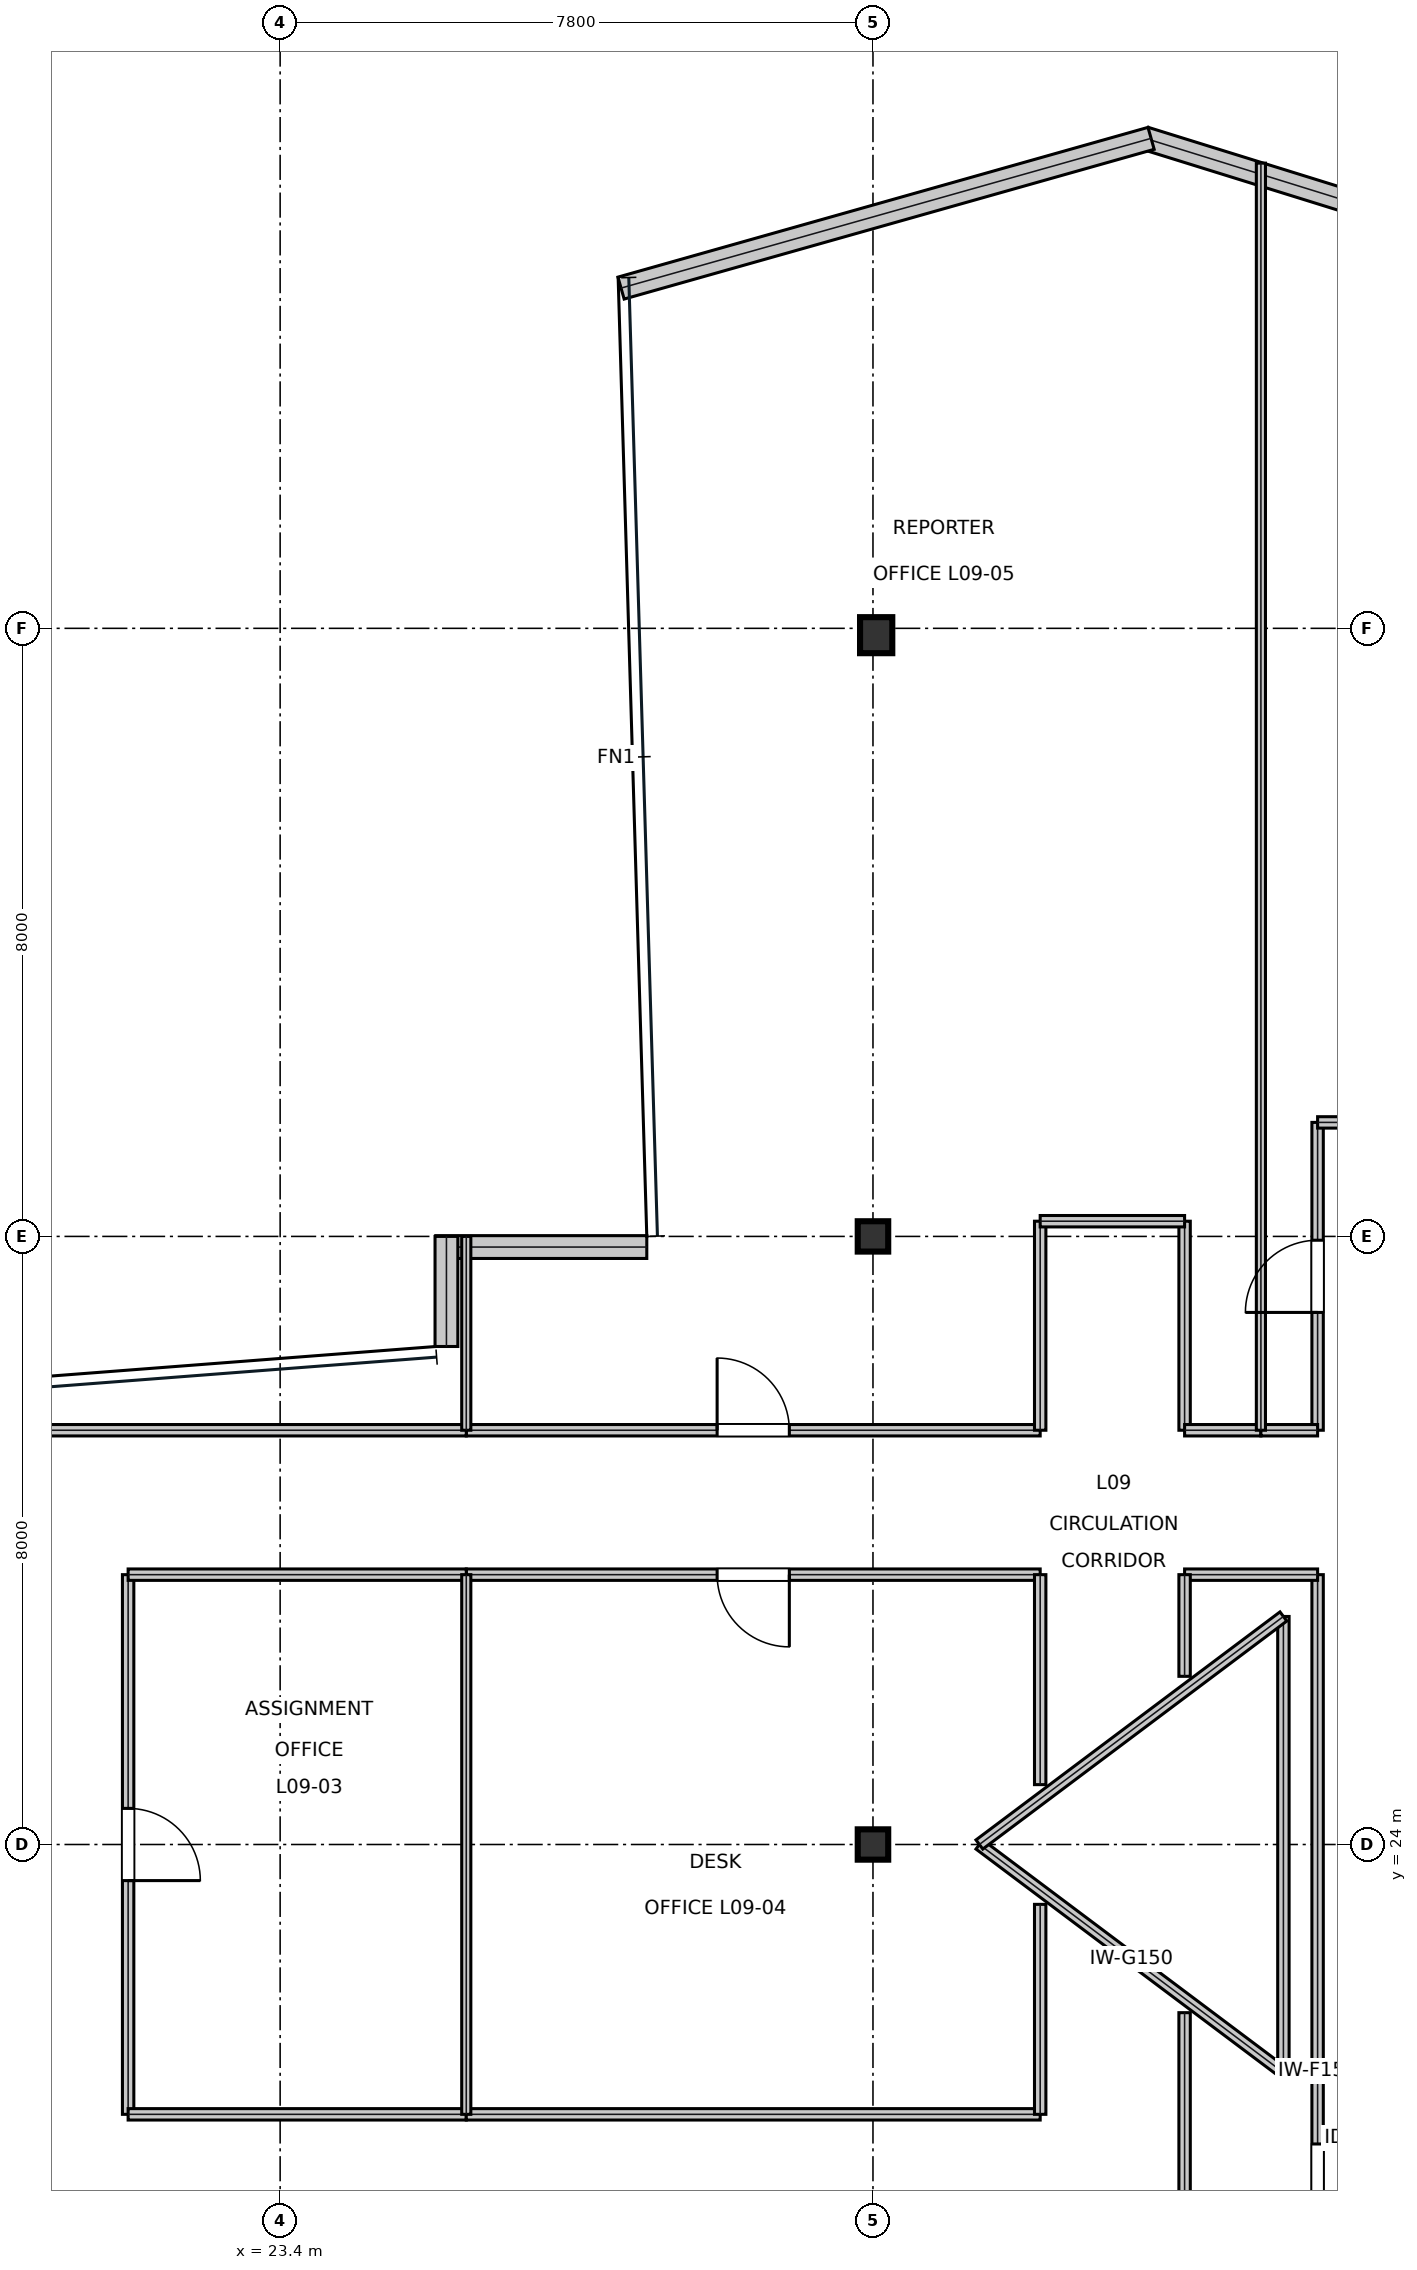
"""IFC4 building model, lengths in metres.
Left out: names, types, materials, properties, quantities, classifications, styles, units other than length and angle.
Written with IfcOpenShell. Run it as: python <this file> out.ifc"""

import sys

from ifc_helpers import new_model, si_unit, direction, frame, frame_2d, origin, origin_2d, place, context, subcontext, project, spatial, rectangle, i_section, extrude, element, fill, save


model = new_model("IFC4")
c1 = context("Model", 3, precision=1e-05, world=origin(), true_north=direction((0.0, 1.0)))
c2 = subcontext(c1, "Body", "Model", "MODEL_VIEW")
j1 = project(units=[si_unit("LENGTHUNIT", "METRE"), si_unit("PLANEANGLEUNIT", "RADIAN")], contexts=[c1])
p1 = place(None, origin())
s1 = spatial("IfcSite", under=j1, at=p1, CompositionType="ELEMENT")
p2 = place(p1, origin())
s2 = spatial("IfcBuilding", under=s1, at=p2, CompositionType="ELEMENT")
p3 = place(p2, frame((0.0, 0.0, 45.9)))
s3 = spatial("IfcBuildingStorey", under=s2, at=p3, CompositionType="ELEMENT", Elevation=45.9)
for number, where, z_axis, x_axis in (
    (1, (31.2, 24.0, 0.0), (0.0, 0.0, 1.0), (1.0, 0.0, 0.0)),
    (2, (31.2, 32.0, 0.0), (0.0, 0.0, 1.0), (1.0, 0.0, 0.0)),
):
    element("IfcColumn", number, at=place(p3, frame(where, z_axis=z_axis, x_axis=x_axis)), inside=s3, PredefinedType="COLUMN", context=c2, shape_type="SweptSolid", body=[
        extrude(i_section(OverallWidth=0.401, OverallDepth=0.399, WebThickness=0.025, FlangeThickness=0.04, at=origin_2d()), origin(), (0.0, 0.0, 1.0), 4.044),
    ])
p4 = place(p3, frame((31.242, 39.91, 0.016), z_axis=(0.017423559696, -0.03727549008, 0.999153120101), x_axis=(0.905919107853, 0.423450788199, 0.0)))
e3 = element("IfcColumn", 3, at=p4, inside=s3, PredefinedType="COLUMN", context=c2, shape_type="SweptSolid", body=[
    extrude(i_section(OverallWidth=0.424, OverallDepth=0.474, WebThickness=0.048, FlangeThickness=0.077, at=origin_2d()), origin(), (0.0, 0.0, 1.0), 4.021),
])
p5 = place(p3, frame((41.753, 44.28, 0.0), z_axis=(0.0, 0.0, 1.0), x_axis=(-0.954957033511, 0.296744105498, 0.0)))
e4 = element("IfcWall", 4, at=p5, inside=s3, PredefinedType="STANDARD", context=c2, shape_type="SweptSolid", body=[
    extrude(rectangle(XDim=7.302, YDim=0.3, at=frame_2d((3.651, 0.0))), origin(), (0.0, 0.0, 1.0), 3.81),
])
p6 = place(p3, frame((34.859, 46.446, 0.0), z_axis=(0.0, 0.0, 1.0), x_axis=(-0.962339681863, -0.271849842212, 0.0)))
e5 = element("IfcWall", 5, at=p6, inside=s3, PredefinedType="STANDARD", context=c2, shape_type="SweptSolid", body=[
    extrude(rectangle(XDim=7.247, YDim=0.3, at=frame_2d((3.623, 0.0))), origin(), (0.0, 0.0, 1.0), 3.81),
])
p7 = place(p3, frame((28.224, 31.86, 0.0), z_axis=(0.0, 0.0, 1.0), x_axis=(-1.0, 0.0, 0.0)))
e6 = element("IfcWall", 6, at=p7, inside=s3, PredefinedType="STANDARD", context=c2, shape_type="SweptSolid", body=[
    extrude(rectangle(XDim=2.776, YDim=0.3, at=frame_2d((1.388, 0.0))), origin(), (0.0, 0.0, 1.0), 3.81),
])
p8 = place(p3, frame((25.588, 32.0, 0.0), z_axis=(0.0, 0.0, 1.0), x_axis=(0.0, -1.0, 0.0)))
e7 = element("IfcWall", 7, at=p8, inside=s3, PredefinedType="STANDARD", context=c2, shape_type="SweptSolid", body=[
    extrude(rectangle(XDim=1.448, YDim=0.3, at=frame_2d((0.724, 0.0))), origin(), (0.0, 0.0, 1.0), 3.338),
])
p9 = place(p3, frame((37.05, 14.5, 0.0), z_axis=(0.0, 0.0, 1.0), x_axis=(0.0, 1.0, 0.0)))
e8 = element("IfcWall", 8, at=p9, inside=s3, PredefinedType="PARTITIONING", context=c2, shape_type="SweptSolid", body=[
    extrude(rectangle(XDim=13.05, YDim=0.15, at=frame_2d((6.525, 0.0))), origin(), (0.0, 0.0, 1.0), 3.181),
])
p10 = place(p9, frame((4.61, 0.0, 0.0)))
e9 = element("IfcOpeningElement", 9, at=p10, cuts=e8, PredefinedType="OPENING", context=c2, shape_type="SweptSolid", body=[
    extrude(rectangle(XDim=0.95, YDim=2.15, at=frame_2d((0.475, 1.075))), frame((0.0, 0.085, 0.0), z_axis=(0.0, -1.0, 0.0), x_axis=(1.0, 0.0, 0.0)), (0.0, 0.0, 1.0), 0.17),
])
p11 = place(p3, frame((21.4, 20.45, 0.0), z_axis=(0.0, 0.0, 1.0), x_axis=(0.0, 1.0, 0.0)))
e10 = element("IfcWall", 10, at=p11, inside=s3, PredefinedType="PARTITIONING", context=c2, shape_type="SweptSolid", body=[
    extrude(rectangle(XDim=7.1, YDim=0.15, at=frame_2d((3.55, 0.0))), origin(), (0.0, 0.0, 1.0), 3.181),
])
p12 = place(p11, frame((3.075, 0.0, 0.0)))
e11 = element("IfcOpeningElement", 11, at=p12, cuts=e10, PredefinedType="OPENING", context=c2, shape_type="SweptSolid", body=[
    extrude(rectangle(XDim=0.95, YDim=2.15, at=frame_2d((0.475, 1.075))), frame((0.0, 0.085, 0.0), z_axis=(0.0, -1.0, 0.0), x_axis=(1.0, 0.0, 0.0)), (0.0, 0.0, 1.0), 0.17),
])
p13 = place(p3, frame((25.849, 27.55, 0.0), z_axis=(0.0, 0.0, 1.0), x_axis=(1.0, 0.0, 0.0)))
e12 = element("IfcWall", 12, at=p13, inside=s3, PredefinedType="PARTITIONING", context=c2, shape_type="SweptSolid", body=[
    extrude(rectangle(XDim=7.551, YDim=0.15, at=frame_2d((3.775, 0.0))), origin(), (0.0, 0.0, 1.0), 3.181),
])
p14 = place(p13, frame((3.301, 0.0, 0.0)))
e13 = element("IfcOpeningElement", 13, at=p14, cuts=e12, PredefinedType="OPENING", context=c2, shape_type="SweptSolid", body=[
    extrude(rectangle(XDim=0.95, YDim=2.15, at=frame_2d((0.475, 1.075))), frame((0.0, 0.085, 0.0), z_axis=(0.0, -1.0, 0.0), x_axis=(1.0, 0.0, 0.0)), (0.0, 0.0, 1.0), 0.17),
])
p15 = place(p3, frame((25.849, 29.45, 0.0), z_axis=(0.0, 0.0, 1.0), x_axis=(1.0, 0.0, 0.0)))
e14 = element("IfcWall", 14, at=p15, inside=s3, PredefinedType="PARTITIONING", context=c2, shape_type="SweptSolid", body=[
    extrude(rectangle(XDim=7.551, YDim=0.15, at=frame_2d((3.775, 0.0))), origin(), (0.0, 0.0, 1.0), 3.181),
])
p16 = place(p15, frame((3.301, 0.0, 0.0)))
e15 = element("IfcOpeningElement", 15, at=p16, cuts=e14, PredefinedType="OPENING", context=c2, shape_type="SweptSolid", body=[
    extrude(rectangle(XDim=0.95, YDim=2.15, at=frame_2d((0.475, 1.075))), frame((0.0, 0.085, 0.0), z_axis=(0.0, -1.0, 0.0), x_axis=(1.0, 0.0, 0.0)), (0.0, 0.0, 1.0), 0.17),
])
p17 = place(p3, frame((37.05, 29.45, 0.0), z_axis=(0.0, 0.0, 1.0), x_axis=(0.0, 1.0, 0.0)))
e16 = element("IfcWall", 16, at=p17, inside=s3, PredefinedType="PARTITIONING", context=c2, shape_type="SweptSolid", body=[
    extrude(rectangle(XDim=4.05, YDim=0.15, at=frame_2d((2.025, 0.0))), origin(), (0.0, 0.0, 1.0), 3.181),
])
p18 = place(p17, frame((1.55, 0.0, 0.0)))
e17 = element("IfcOpeningElement", 17, at=p18, cuts=e16, PredefinedType="OPENING", context=c2, shape_type="SweptSolid", body=[
    extrude(rectangle(XDim=0.95, YDim=2.15, at=frame_2d((0.475, 1.075))), frame((0.0, 0.085, 0.0), z_axis=(0.0, -1.0, 0.0), x_axis=(1.0, 0.0, 0.0)), (0.0, 0.0, 1.0), 0.17),
])
p19 = place(p3, frame((35.3, 15.8, 0.0), z_axis=(0.0, 0.0, 1.0), x_axis=(0.0, 1.0, 0.0)))
e18 = element("IfcWall", 18, at=p19, inside=s3, PredefinedType="PARTITIONING", context=c2, shape_type="SweptSolid", body=[
    extrude(rectangle(XDim=5.988, YDim=0.15, at=frame_2d((2.994, 0.0))), origin(), (0.0, 0.0, 1.0), 3.181),
])
p20 = place(p3, frame((35.3, 27.55, 0.0), z_axis=(0.0, 0.0, 1.0), x_axis=(1.0, 0.0, 0.0)))
e19 = element("IfcWall", 19, at=p20, inside=s3, PredefinedType="PARTITIONING", context=c2, shape_type="SweptSolid", body=[
    extrude(rectangle(XDim=1.75, YDim=0.15, at=frame_2d((0.875, 0.0))), origin(), (0.0, 0.0, 1.0), 3.391),
])
p21 = place(p3, frame((35.3, 26.212, 0.0), z_axis=(0.0, 0.0, 1.0), x_axis=(0.0, 1.0, 0.0)))
e20 = element("IfcWall", 20, at=p21, inside=s3, PredefinedType="PARTITIONING", context=c2, shape_type="SweptSolid", body=[
    extrude(rectangle(XDim=1.338, YDim=0.15, at=frame_2d((0.669, 0.0))), origin(), (0.0, 0.0, 1.0), 3.81),
])
p22 = place(p3, frame((14.0, 29.45, 0.0), z_axis=(0.0, 0.0, 1.0), x_axis=(1.0, 0.0, 0.0)))
e21 = element("IfcWall", 21, at=p22, inside=s3, PredefinedType="PARTITIONING", context=c2, shape_type="SweptSolid", body=[
    extrude(rectangle(XDim=11.849, YDim=0.15, at=frame_2d((5.925, 0.0))), origin(), (0.0, 0.0, 1.0), 3.338),
])
for number, where, z_axis, x_axis in (
    (22, (21.4, 27.55, 0.0), (0.0, 0.0, 1.0), (1.0, 0.0, 0.0)),
    (23, (21.4, 20.45, 0.0), (0.0, 0.0, 1.0), (1.0, 0.0, 0.0)),
):
    element("IfcWall", number, at=place(p3, frame(where, z_axis=z_axis, x_axis=x_axis)), inside=s3, PredefinedType="PARTITIONING", context=c2, shape_type="SweptSolid", body=[
        extrude(rectangle(XDim=4.449, YDim=0.15, at=frame_2d((2.225, 0.0))), origin(), (0.0, 0.0, 1.0), 3.391),
    ])
p23 = place(p3, frame((25.849, 20.45, 0.0), z_axis=(0.0, 0.0, 1.0), x_axis=(1.0, 0.0, 0.0)))
e24 = element("IfcWall", 24, at=p23, inside=s3, PredefinedType="PARTITIONING", context=c2, shape_type="SweptSolid", body=[
    extrude(rectangle(XDim=7.551, YDim=0.15, at=frame_2d((3.775, 0.0))), origin(), (0.0, 0.0, 1.0), 3.181),
])
for number, where, z_axis, x_axis in (
    (25, (33.4, 24.788, 0.0), (0.0, 0.0, 1.0), (0.0, 1.0, 0.0)),
    (26, (33.4, 20.45, 0.0), (0.0, 0.0, 1.0), (0.0, 1.0, 0.0)),
):
    element("IfcWall", number, at=place(p3, frame(where, z_axis=z_axis, x_axis=x_axis)), inside=s3, PredefinedType="PARTITIONING", context=c2, shape_type="SweptSolid", body=[
        extrude(rectangle(XDim=2.762, YDim=0.15, at=frame_2d((1.381, 0.0))), origin(), (0.0, 0.0, 1.0), 3.81),
    ])
for number, where, z_axis, x_axis in (
    (27, (33.4, 29.45, 0.0), (0.0, 0.0, 1.0), (0.0, 1.0, 0.0)),
    (28, (35.3, 29.45, 0.0), (0.0, 0.0, 1.0), (0.0, 1.0, 0.0)),
):
    element("IfcWall", number, at=place(p3, frame(where, z_axis=z_axis, x_axis=x_axis)), inside=s3, PredefinedType="PARTITIONING", context=c2, shape_type="SweptSolid", body=[
        extrude(rectangle(XDim=2.75, YDim=0.15, at=frame_2d((1.375, 0.0))), origin(), (0.0, 0.0, 1.0), 3.181),
    ])
p24 = place(p3, frame((33.4, 32.2, 0.0), z_axis=(0.0, 0.0, 1.0), x_axis=(1.0, 0.0, 0.0)))
e29 = element("IfcWall", 29, at=p24, inside=s3, PredefinedType="PARTITIONING", context=c2, shape_type="SweptSolid", body=[
    extrude(rectangle(XDim=1.9, YDim=0.15, at=frame_2d((0.95, 0.0))), origin(), (0.0, 0.0, 1.0), 3.181),
])
p25 = place(p3, frame((35.3, 29.45, 0.0), z_axis=(0.0, 0.0, 1.0), x_axis=(1.0, 0.0, 0.0)))
e30 = element("IfcWall", 30, at=p25, inside=s3, PredefinedType="PARTITIONING", context=c2, shape_type="SweptSolid", body=[
    extrude(rectangle(XDim=1.004, YDim=0.15, at=frame_2d((0.502, 0.0))), origin(), (0.0, 0.0, 1.0), 3.81),
])
p26 = place(p3, frame((37.05, 33.5, 0.0), z_axis=(0.0, 0.0, 1.0), x_axis=(1.0, 0.0, 0.0)))
e31 = element("IfcWall", 31, at=p26, inside=s3, PredefinedType="PARTITIONING", context=c2, shape_type="SweptSolid", body=[
    extrude(rectangle(XDim=1.9, YDim=0.15, at=frame_2d((0.95, 0.0))), origin(), (0.0, 0.0, 1.0), 3.81),
])
p27 = place(p3, frame((36.304, 29.45, 0.0), z_axis=(0.0, 0.0, 1.0), x_axis=(1.0, 0.0, 0.0)))
e32 = element("IfcWall", 32, at=p27, inside=s3, PredefinedType="PARTITIONING", context=c2, shape_type="SweptSolid", body=[
    extrude(rectangle(XDim=0.746, YDim=0.15, at=frame_2d((0.373, 0.0))), origin(), (0.0, 0.0, 1.0), 3.81),
])
p28 = place(p3, frame((25.849, 29.45, 0.0), z_axis=(0.0, 0.0, 1.0), x_axis=(0.0, 1.0, 0.0)))
e33 = element("IfcWall", 33, at=p28, inside=s3, PredefinedType="PARTITIONING", context=c2, shape_type="SweptSolid", body=[
    extrude(rectangle(XDim=2.55, YDim=0.12, at=frame_2d((1.275, 0.0))), origin(), (0.0, 0.0, 1.0), 3.338),
])
p29 = place(p3, frame((25.849, 20.45, 0.0), z_axis=(0.0, 0.0, 1.0), x_axis=(0.0, 1.0, 0.0)))
e34 = element("IfcWall", 34, at=p29, inside=s3, PredefinedType="PARTITIONING", context=c2, shape_type="SweptSolid", body=[
    extrude(rectangle(XDim=7.1, YDim=0.12, at=frame_2d((3.55, 0.0))), origin(), (0.0, 0.0, 1.0), 3.181),
])
p30 = place(p3, frame((36.304, 29.45, 0.0), z_axis=(0.0, 0.0, 1.0), x_axis=(0.0, 1.0, 0.0)))
e35 = element("IfcWall", 35, at=p30, inside=s3, PredefinedType="PARTITIONING", context=c2, shape_type="SweptSolid", body=[
    extrude(rectangle(XDim=16.67, YDim=0.12, at=frame_2d((8.335, 0.0))), origin(), (0.0, 0.0, 1.0), 3.181),
])
p31 = place(p3, frame((32.6, 24.0, 0.0), z_axis=(0.0, 0.0, 1.0), x_axis=(0.8, -0.6, 0.0)))
e36 = element("IfcWall", 36, at=p31, inside=s3, PredefinedType="MOVABLE", context=c2, shape_type="SweptSolid", body=[
    extrude(rectangle(XDim=5.0, YDim=0.15, at=frame_2d((2.5, 0.0))), origin(), (0.0, 0.0, 1.0), 3.81),
])
p32 = place(p3, frame((36.6, 21.0, 0.0), z_axis=(0.0, 0.0, 1.0), x_axis=(0.0, 1.0, 0.0)))
e37 = element("IfcWall", 37, at=p32, inside=s3, PredefinedType="MOVABLE", context=c2, shape_type="SweptSolid", body=[
    extrude(rectangle(XDim=6.0, YDim=0.15, at=frame_2d((3.0, 0.0))), origin(), (0.0, 0.0, 1.0), 3.81),
])
p33 = place(p3, frame((36.6, 27.0, 0.0), z_axis=(0.0, 0.0, 1.0), x_axis=(-0.8, -0.6, 0.0)))
e38 = element("IfcWall", 38, at=p33, inside=s3, PredefinedType="MOVABLE", context=c2, shape_type="SweptSolid", body=[
    extrude(rectangle(XDim=5.0, YDim=0.15, at=frame_2d((2.5, 0.0))), origin(), (0.0, 0.0, 1.0), 3.81),
])
p34 = place(p10, frame((0.95, 0.0, 0.0), z_axis=(0.0, 0.0, 1.0), x_axis=(-1.0, 0.0, 0.0)))
e39 = element("IfcDoor", 39, at=p34, inside=s3, OperationType="SINGLE_SWING_RIGHT", PredefinedType="DOOR", context=c2, shape_type="SweptSolid", body=[
    extrude(rectangle(XDim=0.95, YDim=2.15, at=frame_2d((0.475, 1.075))), frame((0.0, 0.025, 0.0), z_axis=(0.0, -1.0, 0.0), x_axis=(1.0, 0.0, 0.0)), (0.0, 0.0, 1.0), 0.05),
])
fill(e9, e39)
p35 = place(p12, frame((0.95, 0.0, 0.0), z_axis=(0.0, 0.0, 1.0), x_axis=(-1.0, 0.0, 0.0)))
e40 = element("IfcDoor", 40, at=p35, inside=s3, OperationType="SINGLE_SWING_RIGHT", PredefinedType="DOOR", context=c2, shape_type="SweptSolid", body=[
    extrude(rectangle(XDim=0.95, YDim=2.15, at=frame_2d((0.475, 1.075))), frame((0.0, 0.025, 0.0), z_axis=(0.0, -1.0, 0.0), x_axis=(1.0, 0.0, 0.0)), (0.0, 0.0, 1.0), 0.05),
])
fill(e11, e40)
p36 = place(p14, frame((0.95, 0.0, 0.0), z_axis=(0.0, 0.0, 1.0), x_axis=(-1.0, 0.0, 0.0)))
e41 = element("IfcDoor", 41, at=p36, inside=s3, OperationType="SINGLE_SWING_LEFT", PredefinedType="DOOR", context=c2, shape_type="SweptSolid", body=[
    extrude(rectangle(XDim=0.95, YDim=2.15, at=frame_2d((0.475, 1.075))), frame((0.0, 0.025, 0.0), z_axis=(0.0, -1.0, 0.0), x_axis=(1.0, 0.0, 0.0)), (0.0, 0.0, 1.0), 0.05),
])
fill(e13, e41)
p37 = place(p16, origin())
e42 = element("IfcDoor", 42, at=p37, inside=s3, OperationType="SINGLE_SWING_LEFT", PredefinedType="DOOR", context=c2, shape_type="SweptSolid", body=[
    extrude(rectangle(XDim=0.95, YDim=2.15, at=frame_2d((0.475, 1.075))), frame((0.0, 0.025, 0.0), z_axis=(0.0, -1.0, 0.0), x_axis=(1.0, 0.0, 0.0)), (0.0, 0.0, 1.0), 0.05),
])
fill(e15, e42)
p38 = place(p18, origin())
e43 = element("IfcDoor", 43, at=p38, inside=s3, OperationType="SINGLE_SWING_LEFT", PredefinedType="DOOR", context=c2, shape_type="SweptSolid", body=[
    extrude(rectangle(XDim=0.95, YDim=2.15, at=frame_2d((0.475, 1.075))), frame((0.0, 0.025, 0.0), z_axis=(0.0, -1.0, 0.0), x_axis=(1.0, 0.0, 0.0)), (0.0, 0.0, 1.0), 0.05),
])
fill(e17, e43)
save(model, sys.argv[1])
